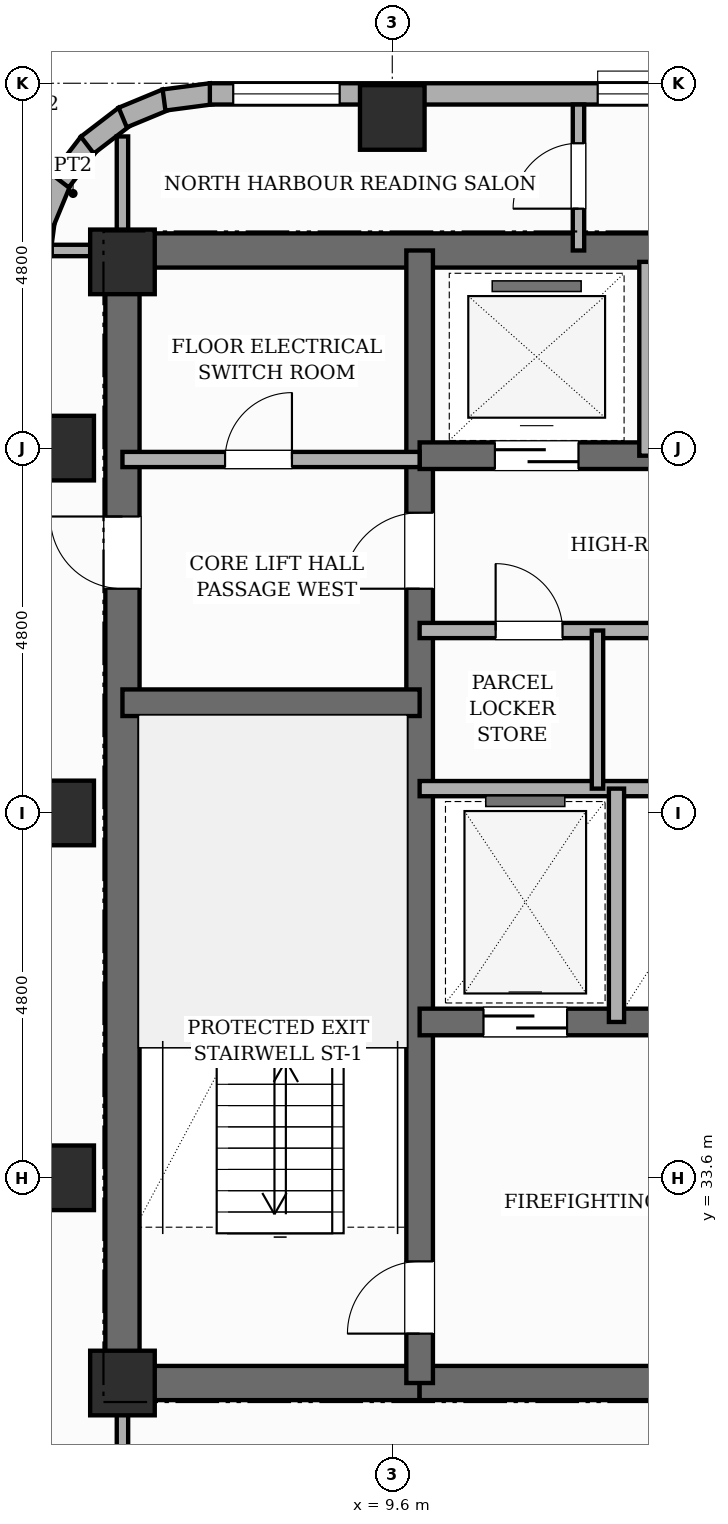
"""IFC4 building model, lengths in metres.
Left out: names, types, materials, properties, quantities, classifications, styles, units other than length and angle.
Written with IfcOpenShell. Run it as: python <this file> out.ifc"""

import sys

from ifc_helpers import new_model, si_unit, direction, frame, frame_2d, origin, origin_2d, place, context, subcontext, project, spatial, rectangle, extrude, element, fill, save


model = new_model("IFC4")
c1 = context("Model", 3, precision=1e-05, world=origin(), true_north=direction((0.0, 1.0)))
c2 = subcontext(c1, "Body", "Model", "MODEL_VIEW")
j1 = project(units=[si_unit("LENGTHUNIT", "METRE"), si_unit("PLANEANGLEUNIT", "RADIAN")], contexts=[c1])
p1 = place(None, origin())
s1 = spatial("IfcSite", under=j1, at=p1, CompositionType="ELEMENT")
p2 = place(p1, origin())
s2 = spatial("IfcBuilding", under=s1, at=p2, CompositionType="ELEMENT")
p3 = place(p2, frame((0.0, 0.0, 236.2)))
s3 = spatial("IfcBuildingStorey", under=s2, at=p3, CompositionType="ELEMENT", Elevation=236.2)
p4 = place(p3, frame((6.05, 30.675, 0.0), z_axis=(0.0, 0.0, 1.0), x_axis=(0.0, 1.0, 0.0)))
e1 = element("IfcWall", 1, at=p4, inside=s3, PredefinedType="SHEAR", context=c2, shape_type="SweptSolid", body=[
    extrude(rectangle(XDim=15.35, YDim=0.45, at=frame_2d((7.675, 0.0))), origin(), (0.0, 0.0, 1.0), 3.6),
])
p5 = place(p4, frame((10.675, 0.0, 0.0)))
e2 = element("IfcOpeningElement", 2, at=p5, cuts=e1, PredefinedType="OPENING", context=c2, shape_type="SweptSolid", body=[
    extrude(rectangle(XDim=0.95, YDim=2.15, at=frame_2d((0.475, 1.075))), frame((0.0, 0.235, 0.0), z_axis=(0.0, -1.0, 0.0), x_axis=(1.0, 0.0, 0.0)), (0.0, 0.0, 1.0), 0.47),
])
p6 = place(p3, frame((6.05, 45.8, 0.0), z_axis=(0.0, 0.0, 1.0), x_axis=(1.0, 0.0, 0.0)))
e3 = element("IfcWall", 3, at=p6, inside=s3, PredefinedType="SHEAR", context=c2, shape_type="SweptSolid", body=[
    extrude(rectangle(XDim=16.7, YDim=0.45, at=frame_2d((8.35, 0.0))), origin(), (0.0, 0.0, 1.0), 3.6),
])
p7 = place(p3, frame((6.05, 30.9, 0.0), z_axis=(0.0, 0.0, 1.0), x_axis=(1.0, 0.0, 0.0)))
e4 = element("IfcWall", 4, at=p7, inside=s3, PredefinedType="SHEAR", context=c2, shape_type="SweptSolid", body=[
    extrude(rectangle(XDim=3.91, YDim=0.45, at=frame_2d((1.955, 0.0))), origin(), (0.0, 0.0, 1.0), 3.6),
])
p8 = place(p3, frame((9.96, 30.9, 0.0), z_axis=(0.0, 0.0, 1.0), x_axis=(1.0, 0.0, 0.0)))
e5 = element("IfcWall", 5, at=p8, inside=s3, PredefinedType="SHEAR", context=c2, shape_type="SweptSolid", body=[
    extrude(rectangle(XDim=8.88, YDim=0.45, at=frame_2d((4.44, 0.0))), origin(), (0.0, 0.0, 1.0), 3.6),
])
p9 = place(p8, frame((4.09, 0.0, 0.0)))
e6 = element("IfcOpeningElement", 6, at=p9, cuts=e5, PredefinedType="OPENING", context=c2, shape_type="SweptSolid", body=[
    extrude(rectangle(XDim=1.0, YDim=2.15, at=frame_2d((0.5, 1.075))), frame((0.0, 0.235, 0.0), z_axis=(0.0, -1.0, 0.0), x_axis=(1.0, 0.0, 0.0)), (0.0, 0.0, 1.0), 0.47),
])
p10 = place(p3, frame((9.96, 30.9, 0.0), z_axis=(0.0, 0.0, 1.0), x_axis=(0.0, 1.0, 0.0)))
e7 = element("IfcWall", 7, at=p10, inside=s3, PredefinedType="SHEAR", context=c2, shape_type="SweptSolid", body=[
    extrude(rectangle(XDim=14.9, YDim=0.35, at=frame_2d((7.45, 0.0))), origin(), (0.0, 0.0, 1.0), 3.6),
])
p11 = place(p10, frame((0.65, 0.0, 0.0)))
e8 = element("IfcOpeningElement", 8, at=p11, cuts=e7, PredefinedType="OPENING", context=c2, shape_type="SweptSolid", body=[
    extrude(rectangle(XDim=0.95, YDim=2.1, at=frame_2d((0.475, 1.05))), frame((0.0, 0.185, 0.0), z_axis=(0.0, -1.0, 0.0), x_axis=(1.0, 0.0, 0.0)), (0.0, 0.0, 1.0), 0.37),
])
p12 = place(p10, frame((10.45, 0.0, 0.0)))
e9 = element("IfcOpeningElement", 9, at=p12, cuts=e7, PredefinedType="OPENING", context=c2, shape_type="SweptSolid", body=[
    extrude(rectangle(XDim=1.0, YDim=2.15, at=frame_2d((0.5, 1.075))), frame((0.0, 0.185, 0.0), z_axis=(0.0, -1.0, 0.0), x_axis=(1.0, 0.0, 0.0)), (0.0, 0.0, 1.0), 0.37),
])
p13 = place(p3, frame((6.05, 39.85, 0.0), z_axis=(0.0, 0.0, 1.0), x_axis=(1.0, 0.0, 0.0)))
e10 = element("IfcWall", 10, at=p13, inside=s3, PredefinedType="SHEAR", context=c2, shape_type="SweptSolid", body=[
    extrude(rectangle(XDim=3.91, YDim=0.35, at=frame_2d((1.955, 0.0))), origin(), (0.0, 0.0, 1.0), 3.6),
])
p14 = place(p3, frame((9.96, 35.65, 0.0), z_axis=(0.0, 0.0, 1.0), x_axis=(1.0, 0.0, 0.0)))
e11 = element("IfcWall", 11, at=p14, inside=s3, PredefinedType="SHEAR", context=c2, shape_type="SweptSolid", body=[
    extrude(rectangle(XDim=8.88, YDim=0.35, at=frame_2d((4.44, 0.0))), origin(), (0.0, 0.0, 1.0), 3.6),
])
p15 = place(p14, frame((0.84, 0.0, 0.0)))
e12 = element("IfcOpeningElement", 12, at=p15, cuts=e11, PredefinedType="OPENING", context=c2, shape_type="SweptSolid", body=[
    extrude(rectangle(XDim=1.1, YDim=2.15, at=frame_2d((0.55, 1.075))), frame((0.0, 0.185, 0.0), z_axis=(0.0, -1.0, 0.0), x_axis=(1.0, 0.0, 0.0)), (0.0, 0.0, 1.0), 0.37),
])
p16 = place(p14, frame((5.24, 0.0, 0.0)))
e13 = element("IfcOpeningElement", 13, at=p16, cuts=e11, PredefinedType="OPENING", context=c2, shape_type="SweptSolid", body=[
    extrude(rectangle(XDim=1.1, YDim=2.15, at=frame_2d((0.55, 1.075))), frame((0.0, 0.185, 0.0), z_axis=(0.0, -1.0, 0.0), x_axis=(1.0, 0.0, 0.0)), (0.0, 0.0, 1.0), 0.37),
])
p17 = place(p14, frame((7.5, 0.0, 0.0)))
e14 = element("IfcOpeningElement", 14, at=p17, cuts=e11, PredefinedType="OPENING", context=c2, shape_type="SweptSolid", body=[
    extrude(rectangle(XDim=0.88, YDim=2.1, at=frame_2d((0.44, 1.05))), frame((0.0, 0.185, 0.0), z_axis=(0.0, -1.0, 0.0), x_axis=(1.0, 0.0, 0.0)), (0.0, 0.0, 1.0), 0.37),
])
p18 = place(p3, frame((9.96, 43.1, 0.0), z_axis=(0.0, 0.0, 1.0), x_axis=(1.0, 0.0, 0.0)))
e15 = element("IfcWall", 15, at=p18, inside=s3, PredefinedType="SHEAR", context=c2, shape_type="SweptSolid", body=[
    extrude(rectangle(XDim=8.88, YDim=0.35, at=frame_2d((4.44, 0.0))), origin(), (0.0, 0.0, 1.0), 3.6),
])
p19 = place(p18, frame((0.99, 0.0, 0.0)))
e16 = element("IfcOpeningElement", 16, at=p19, cuts=e15, PredefinedType="OPENING", context=c2, shape_type="SweptSolid", body=[
    extrude(rectangle(XDim=1.1, YDim=2.15, at=frame_2d((0.55, 1.075))), frame((0.0, 0.185, 0.0), z_axis=(0.0, -1.0, 0.0), x_axis=(1.0, 0.0, 0.0)), (0.0, 0.0, 1.0), 0.37),
])
p20 = place(p18, frame((3.89, 0.0, 0.0)))
e17 = element("IfcOpeningElement", 17, at=p20, cuts=e15, PredefinedType="OPENING", context=c2, shape_type="SweptSolid", body=[
    extrude(rectangle(XDim=1.1, YDim=2.15, at=frame_2d((0.55, 1.075))), frame((0.0, 0.185, 0.0), z_axis=(0.0, -1.0, 0.0), x_axis=(1.0, 0.0, 0.0)), (0.0, 0.0, 1.0), 0.37),
])
p21 = place(p18, frame((6.79, 0.0, 0.0)))
e18 = element("IfcOpeningElement", 18, at=p21, cuts=e15, PredefinedType="OPENING", context=c2, shape_type="SweptSolid", body=[
    extrude(rectangle(XDim=1.1, YDim=2.15, at=frame_2d((0.55, 1.075))), frame((0.0, 0.185, 0.0), z_axis=(0.0, -1.0, 0.0), x_axis=(1.0, 0.0, 0.0)), (0.0, 0.0, 1.0), 0.37),
])
for number, where, z_axis, x_axis in (
    (19, (5.25, 33.6, 0.0), (0.0, 0.0, 1.0), (1.0, 0.0, 0.0)),
    (20, (5.25, 38.4, 0.0), (0.0, 0.0, 1.0), (1.0, 0.0, 0.0)),
    (21, (5.25, 43.2, 0.0), (0.0, 0.0, 1.0), (1.0, 0.0, 0.0)),
    (22, (6.05, 30.9, 0.0), (0.0, 0.0, 1.0), (1.0, 0.0, 0.0)),
    (23, (6.05, 45.65, 0.0), (0.0, 0.0, 1.0), (1.0, 0.0, 0.0)),
    (24, (9.6, 47.55, 0.0), (0.0, 0.0, 1.0), (1.0, 0.0, 0.0)),
):
    element("IfcColumn", number, at=place(p3, frame(where, z_axis=z_axis, x_axis=x_axis)), inside=s3, PredefinedType="COLUMN", context=c2, shape_type="SweptSolid", body=[
        extrude(rectangle(XDim=0.85, YDim=0.85, at=origin_2d()), origin(), (0.0, 0.0, 1.0), 3.6),
    ])
for number, where, z_axis, x_axis in (
    (25, (4.939, 45.582, 0.0), (0.0, 0.0, 1.0), (0.131, 0.991, 0.0)),
    (26, (5.011, 46.167, 0.0), (0.0, 0.0, 1.0), (0.383, 0.924, 0.0)),
    (27, (5.233, 46.715, 0.0), (0.0, 0.0, 1.0), (0.609, 0.793, 0.0)),
    (28, (5.588, 47.186, 0.0), (0.0, 0.0, 1.0), (0.793, 0.609, 0.0)),
):
    element("IfcWall", number, at=place(p3, frame(where, z_axis=z_axis, x_axis=x_axis)), inside=s3, PredefinedType="STANDARD", context=c2, shape_type="SweptSolid", body=[
        extrude(rectangle(XDim=0.626, YDim=0.28, at=frame_2d((0.313, 0.0))), origin(), (0.0, 0.0, 1.0), 3.32),
    ])
p22 = place(p3, frame((6.054, 47.549, 0.0), z_axis=(0.0, 0.0, 1.0), x_axis=(0.923974080304, 0.382455093999, 0.0)))
e29 = element("IfcWall", 29, at=p22, inside=s3, PredefinedType="STANDARD", context=c2, shape_type="SweptSolid", body=[
    extrude(rectangle(XDim=0.626, YDim=0.28, at=frame_2d((0.313, 0.0))), origin(), (0.0, 0.0, 1.0), 3.32),
])
p23 = place(p3, frame((6.597, 47.779, 0.0), z_axis=(0.0, 0.0, 1.0), x_axis=(0.9914410257, 0.130555323746, 0.0)))
e30 = element("IfcWall", 30, at=p23, inside=s3, PredefinedType="STANDARD", context=c2, shape_type="SweptSolid", body=[
    extrude(rectangle(XDim=0.626, YDim=0.28, at=frame_2d((0.313, 0.0))), origin(), (0.0, 0.0, 1.0), 3.32),
])
p24 = place(p3, frame((7.2, 47.86, 0.0), z_axis=(0.0, 0.0, 1.0), x_axis=(1.0, 0.0, 0.0)))
e31 = element("IfcWall", 31, at=p24, inside=s3, PredefinedType="STANDARD", context=c2, shape_type="SweptSolid", body=[
    extrude(rectangle(XDim=43.2, YDim=0.28, at=frame_2d((21.6, 0.0))), origin(), (0.0, 0.0, 1.0), 2.6),
])
p25 = place(p24, frame((19.028, 0.0, 0.65)))
e32 = element("IfcOpeningElement", 32, at=p25, cuts=e31, PredefinedType="OPENING", context=c2, shape_type="SweptSolid", body=[
    extrude(rectangle(XDim=1.4, YDim=1.1, at=frame_2d((0.7, 0.55))), frame((0.0, 0.15, 0.0), z_axis=(0.0, -1.0, 0.0), x_axis=(1.0, 0.0, 0.0)), (0.0, 0.0, 1.0), 0.3),
])
p26 = place(p24, frame((0.308, 0.0, 0.65)))
e33 = element("IfcOpeningElement", 33, at=p26, cuts=e31, PredefinedType="OPENING", context=c2, shape_type="SweptSolid", body=[
    extrude(rectangle(XDim=1.4, YDim=1.1, at=frame_2d((0.7, 0.55))), frame((0.0, 0.15, 0.0), z_axis=(0.0, -1.0, 0.0), x_axis=(1.0, 0.0, 0.0)), (0.0, 0.0, 1.0), 0.3),
])
p27 = place(p24, frame((5.103, 0.0, 0.65)))
e34 = element("IfcOpeningElement", 34, at=p27, cuts=e31, PredefinedType="OPENING", context=c2, shape_type="SweptSolid", body=[
    extrude(rectangle(XDim=1.4, YDim=1.1, at=frame_2d((0.7, 0.55))), frame((0.0, 0.15, 0.0), z_axis=(0.0, -1.0, 0.0), x_axis=(1.0, 0.0, 0.0)), (0.0, 0.0, 1.0), 0.3),
])
p28 = place(p3, frame((9.96, 38.72, 0.0), z_axis=(0.0, 0.0, 1.0), x_axis=(1.0, 0.0, 0.0)))
e35 = element("IfcWall", 35, at=p28, inside=s3, PredefinedType="POLYGONAL", context=c2, shape_type="SweptSolid", body=[
    extrude(rectangle(XDim=7.06, YDim=0.2, at=frame_2d((3.53, 0.0))), origin(), (0.0, 0.0, 1.0), 3.32),
])
p29 = place(p3, frame((12.55, 35.65, 0.0), z_axis=(0.0, 0.0, 1.0), x_axis=(0.0, 1.0, 0.0)))
e36 = element("IfcWall", 36, at=p29, inside=s3, PredefinedType="POLYGONAL", context=c2, shape_type="SweptSolid", body=[
    extrude(rectangle(XDim=3.07, YDim=0.2, at=frame_2d((1.535, 0.0))), origin(), (0.0, 0.0, 1.0), 3.32),
])
p30 = place(p3, frame((9.96, 40.8, 0.0), z_axis=(0.0, 0.0, 1.0), x_axis=(1.0, 0.0, 0.0)))
e37 = element("IfcWall", 37, at=p30, inside=s3, PredefinedType="POLYGONAL", context=c2, shape_type="SweptSolid", body=[
    extrude(rectangle(XDim=8.88, YDim=0.2, at=frame_2d((4.44, 0.0))), origin(), (0.0, 0.0, 1.0), 3.32),
])
p31 = place(p30, frame((7.5, 0.0, 0.0)))
e38 = element("IfcOpeningElement", 38, at=p31, cuts=e37, PredefinedType="OPENING", context=c2, shape_type="SweptSolid", body=[
    extrude(rectangle(XDim=0.88, YDim=2.1, at=frame_2d((0.44, 1.05))), frame((0.0, 0.11, 0.0), z_axis=(0.0, -1.0, 0.0), x_axis=(1.0, 0.0, 0.0)), (0.0, 0.0, 1.0), 0.22),
])
p32 = place(p30, frame((1.0, 0.0, 0.0)))
e39 = element("IfcOpeningElement", 39, at=p32, cuts=e37, PredefinedType="OPENING", context=c2, shape_type="SweptSolid", body=[
    extrude(rectangle(XDim=0.88, YDim=2.1, at=frame_2d((0.44, 1.05))), frame((0.0, 0.11, 0.0), z_axis=(0.0, -1.0, 0.0), x_axis=(1.0, 0.0, 0.0)), (0.0, 0.0, 1.0), 0.22),
])
p33 = place(p30, frame((3.4, 0.0, 0.0)))
e40 = element("IfcOpeningElement", 40, at=p33, cuts=e37, PredefinedType="OPENING", context=c2, shape_type="SweptSolid", body=[
    extrude(rectangle(XDim=0.88, YDim=2.1, at=frame_2d((0.44, 1.05))), frame((0.0, 0.11, 0.0), z_axis=(0.0, -1.0, 0.0), x_axis=(1.0, 0.0, 0.0)), (0.0, 0.0, 1.0), 0.22),
])
p34 = place(p30, frame((5.55, 0.0, 0.0)))
e41 = element("IfcOpeningElement", 41, at=p34, cuts=e37, PredefinedType="OPENING", context=c2, shape_type="SweptSolid", body=[
    extrude(rectangle(XDim=0.88, YDim=2.1, at=frame_2d((0.44, 1.05))), frame((0.0, 0.11, 0.0), z_axis=(0.0, -1.0, 0.0), x_axis=(1.0, 0.0, 0.0)), (0.0, 0.0, 1.0), 0.22),
])
p35 = place(p3, frame((6.05, 43.05, 0.0), z_axis=(0.0, 0.0, 1.0), x_axis=(1.0, 0.0, 0.0)))
e42 = element("IfcWall", 42, at=p35, inside=s3, PredefinedType="POLYGONAL", context=c2, shape_type="SweptSolid", body=[
    extrude(rectangle(XDim=3.91, YDim=0.2, at=frame_2d((1.955, 0.0))), origin(), (0.0, 0.0, 1.0), 2.6),
])
p36 = place(p35, frame((1.35, 0.0, 0.0)))
e43 = element("IfcOpeningElement", 43, at=p36, cuts=e42, PredefinedType="OPENING", context=c2, shape_type="SweptSolid", body=[
    extrude(rectangle(XDim=0.88, YDim=2.1, at=frame_2d((0.44, 1.05))), frame((0.0, 0.11, 0.0), z_axis=(0.0, -1.0, 0.0), x_axis=(1.0, 0.0, 0.0)), (0.0, 0.0, 1.0), 0.22),
])
p37 = place(p3, frame((12.95, 43.1, 0.0), z_axis=(0.0, 0.0, 1.0), x_axis=(0.0, 1.0, 0.0)))
e44 = element("IfcWall", 44, at=p37, inside=s3, PredefinedType="POLYGONAL", context=c2, shape_type="SweptSolid", body=[
    extrude(rectangle(XDim=2.55, YDim=0.2, at=frame_2d((1.275, 0.0))), origin(), (0.0, 0.0, 1.0), 3.32),
])
p38 = place(p3, frame((12.3, 38.72, 0.0), z_axis=(0.0, 0.0, 1.0), x_axis=(0.0, 1.0, 0.0)))
e45 = element("IfcWall", 45, at=p38, inside=s3, PredefinedType="PARTITIONING", context=c2, shape_type="SweptSolid", body=[
    extrude(rectangle(XDim=2.08, YDim=0.15, at=frame_2d((1.04, 0.0))), origin(), (0.0, 0.0, 1.0), 3.32),
])
p39 = place(p3, frame((6.05, 25.75, 0.0), z_axis=(0.0, 0.0, 1.0), x_axis=(0.0, 1.0, 0.0)))
e46 = element("IfcWall", 46, at=p39, inside=s3, PredefinedType="PARTITIONING", context=c2, shape_type="SweptSolid", body=[
    extrude(rectangle(XDim=5.15, YDim=0.15, at=frame_2d((2.575, 0.0))), origin(), (0.0, 0.0, 1.0), 3.32),
])
p40 = place(p3, frame((5.12, 45.8, 0.0), z_axis=(0.0, 0.0, 1.0), x_axis=(1.0, 0.0, 0.0)))
e47 = element("IfcWall", 47, at=p40, inside=s3, PredefinedType="PARTITIONING", context=c2, shape_type="SweptSolid", body=[
    extrude(rectangle(XDim=0.93, YDim=0.15, at=frame_2d((0.465, 0.0))), origin(), (0.0, 0.0, 1.0), 3.32),
])
p41 = place(p3, frame((6.05, 45.8, 0.0), z_axis=(0.0, 0.0, 1.0), x_axis=(0.0, 1.0, 0.0)))
e48 = element("IfcWall", 48, at=p41, inside=s3, PredefinedType="PARTITIONING", context=c2, shape_type="SweptSolid", body=[
    extrude(rectangle(XDim=1.5, YDim=0.15, at=frame_2d((0.75, 0.0))), origin(), (0.0, 0.0, 1.0), 3.32),
])
p42 = place(p3, frame((12.05, 45.8, 0.0), z_axis=(0.0, 0.0, 1.0), x_axis=(0.0, 1.0, 0.0)))
e49 = element("IfcWall", 49, at=p42, inside=s3, PredefinedType="PARTITIONING", context=c2, shape_type="SweptSolid", body=[
    extrude(rectangle(XDim=1.92, YDim=0.15, at=frame_2d((0.96, 0.0))), origin(), (0.0, 0.0, 1.0), 3.32),
])
p43 = place(p42, frame((0.55, 0.0, 0.0)))
e50 = element("IfcOpeningElement", 50, at=p43, cuts=e49, PredefinedType="OPENING", context=c2, shape_type="SweptSolid", body=[
    extrude(rectangle(XDim=0.86, YDim=2.1, at=frame_2d((0.43, 1.05))), frame((0.0, 0.085, 0.0), z_axis=(0.0, -1.0, 0.0), x_axis=(1.0, 0.0, 0.0)), (0.0, 0.0, 1.0), 0.17),
])
p44 = place(p26, origin())
e51 = element("IfcWindow", 51, at=p44, inside=s3, PartitioningType="SINGLE_PANEL", PredefinedType="WINDOW", context=c2, shape_type="SweptSolid", body=[
    extrude(rectangle(XDim=1.4, YDim=1.1, at=frame_2d((0.7, 0.55))), frame((0.0, 0.03, 0.0), z_axis=(0.0, -1.0, 0.0), x_axis=(1.0, 0.0, 0.0)), (0.0, 0.0, 1.0), 0.06),
])
fill(e33, e51)
p45 = place(p27, origin())
e52 = element("IfcWindow", 52, at=p45, inside=s3, PartitioningType="SINGLE_PANEL", PredefinedType="WINDOW", context=c2, shape_type="SweptSolid", body=[
    extrude(rectangle(XDim=1.4, YDim=1.1, at=frame_2d((0.7, 0.55))), frame((0.0, 0.03, 0.0), z_axis=(0.0, -1.0, 0.0), x_axis=(1.0, 0.0, 0.0)), (0.0, 0.0, 1.0), 0.06),
])
fill(e34, e52)
p46 = place(p11, origin())
e53 = element("IfcDoor", 53, at=p46, inside=s3, OperationType="SINGLE_SWING_LEFT", PredefinedType="DOOR", context=c2, shape_type="SweptSolid", body=[
    extrude(rectangle(XDim=0.95, YDim=2.1, at=frame_2d((0.475, 1.05))), frame((0.0, 0.025, 0.0), z_axis=(0.0, -1.0, 0.0), x_axis=(1.0, 0.0, 0.0)), (0.0, 0.0, 1.0), 0.05),
])
fill(e8, e53)
p47 = place(p15, origin())
e54 = element("IfcDoor", 54, at=p47, inside=s3, OperationType="SLIDING_TO_LEFT", PredefinedType="DOOR", context=c2, shape_type="SweptSolid", body=[
    extrude(rectangle(XDim=1.1, YDim=2.15, at=frame_2d((0.55, 1.075))), frame((0.0, 0.025, 0.0), z_axis=(0.0, -1.0, 0.0), x_axis=(1.0, 0.0, 0.0)), (0.0, 0.0, 1.0), 0.05),
])
fill(e12, e54)
p48 = place(p19, origin())
e55 = element("IfcDoor", 55, at=p48, inside=s3, OperationType="SLIDING_TO_LEFT", PredefinedType="DOOR", context=c2, shape_type="SweptSolid", body=[
    extrude(rectangle(XDim=1.1, YDim=2.15, at=frame_2d((0.55, 1.075))), frame((0.0, 0.025, 0.0), z_axis=(0.0, -1.0, 0.0), x_axis=(1.0, 0.0, 0.0)), (0.0, 0.0, 1.0), 0.05),
])
fill(e16, e55)
p49 = place(p12, origin())
e56 = element("IfcDoor", 56, at=p49, inside=s3, OperationType="SINGLE_SWING_LEFT", PredefinedType="DOOR", context=c2, shape_type="SweptSolid", body=[
    extrude(rectangle(XDim=1.0, YDim=2.15, at=frame_2d((0.5, 1.075))), frame((0.0, 0.025, 0.0), z_axis=(0.0, -1.0, 0.0), x_axis=(1.0, 0.0, 0.0)), (0.0, 0.0, 1.0), 0.05),
])
fill(e9, e56)
p50 = place(p5, origin())
e57 = element("IfcDoor", 57, at=p50, inside=s3, OperationType="SINGLE_SWING_RIGHT", PredefinedType="DOOR", context=c2, shape_type="SweptSolid", body=[
    extrude(rectangle(XDim=0.95, YDim=2.15, at=frame_2d((0.475, 1.075))), frame((0.0, 0.025, 0.0), z_axis=(0.0, -1.0, 0.0), x_axis=(1.0, 0.0, 0.0)), (0.0, 0.0, 1.0), 0.05),
])
fill(e2, e57)
p51 = place(p36, origin())
e58 = element("IfcDoor", 58, at=p51, inside=s3, OperationType="SINGLE_SWING_RIGHT", PredefinedType="DOOR", context=c2, shape_type="SweptSolid", body=[
    extrude(rectangle(XDim=0.88, YDim=2.1, at=frame_2d((0.44, 1.05))), frame((0.0, 0.025, 0.0), z_axis=(0.0, -1.0, 0.0), x_axis=(1.0, 0.0, 0.0)), (0.0, 0.0, 1.0), 0.05),
])
fill(e43, e58)
p52 = place(p32, origin())
e59 = element("IfcDoor", 59, at=p52, inside=s3, OperationType="SINGLE_SWING_LEFT", PredefinedType="DOOR", context=c2, shape_type="SweptSolid", body=[
    extrude(rectangle(XDim=0.88, YDim=2.1, at=frame_2d((0.44, 1.05))), frame((0.0, 0.025, 0.0), z_axis=(0.0, -1.0, 0.0), x_axis=(1.0, 0.0, 0.0)), (0.0, 0.0, 1.0), 0.05),
])
fill(e39, e59)
p53 = place(p43, origin())
e60 = element("IfcDoor", 60, at=p53, inside=s3, OperationType="SINGLE_SWING_LEFT", PredefinedType="DOOR", context=c2, shape_type="SweptSolid", body=[
    extrude(rectangle(XDim=0.86, YDim=2.1, at=frame_2d((0.43, 1.05))), frame((0.0, 0.025, 0.0), z_axis=(0.0, -1.0, 0.0), x_axis=(1.0, 0.0, 0.0)), (0.0, 0.0, 1.0), 0.05),
])
fill(e50, e60)
save(model, sys.argv[1])
